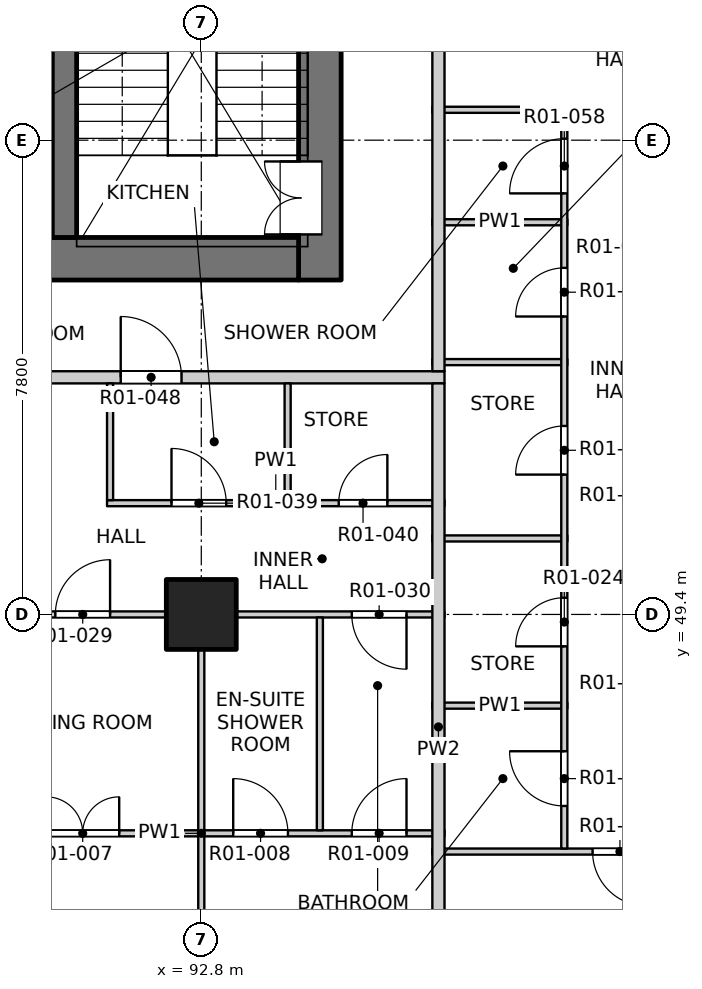
"""IFC4 building model, lengths in metres.
Left out: names, types, materials, properties, quantities, classifications, styles, units other than length and angle.
Written with IfcOpenShell. Run it as: python <this file> out.ifc"""

import sys

from ifc_helpers import new_model, si_unit, direction, frame, frame_2d, origin, origin_2d, place, context, subcontext, project, spatial, rectangle, extrude, element, fill, save


model = new_model("IFC4")
c1 = context("Model", 3, precision=1e-05, world=origin(), true_north=direction((0.0, 1.0)))
c2 = subcontext(c1, "Body", "Model", "MODEL_VIEW")
j1 = project(units=[si_unit("LENGTHUNIT", "METRE"), si_unit("PLANEANGLEUNIT", "RADIAN")], contexts=[c1])
p1 = place(None, origin())
s1 = spatial("IfcSite", under=j1, at=p1, CompositionType="ELEMENT")
p2 = place(p1, origin())
s2 = spatial("IfcBuilding", under=s1, at=p2, CompositionType="ELEMENT")
p3 = place(p2, frame((0.0, 0.0, 19.5)))
s3 = spatial("IfcBuildingStorey", under=s2, at=p3, CompositionType="ELEMENT", Elevation=19.5)
p4 = place(p3, frame((92.8, 49.4, -0.25), z_axis=(0.0, 0.0, 1.0), x_axis=(1.0, 0.0, 0.0)))
e1 = element("IfcColumn", 1, at=p4, inside=s3, PredefinedType="COLUMN", context=c2, shape_type="SweptSolid", body=[
    extrude(rectangle(XDim=1.15, YDim=1.15, at=origin_2d()), origin(), (0.0, 0.0, 1.0), 3.4),
])
p5 = place(p3, frame((94.75, 54.9, -0.25), z_axis=(0.0, 0.0, 1.0), x_axis=(0.0, 1.0, 0.0)))
e2 = element("IfcWall", 2, at=p5, inside=s3, PredefinedType="SOLIDWALL", context=c2, shape_type="SweptSolid", body=[
    extrude(rectangle(XDim=7.05, YDim=0.7, at=frame_2d((3.525, 0.0))), origin(), (0.0, 0.0, 1.0), 3.4),
])
p6 = place(p5, frame((0.75, 0.0, 0.25)))
e3 = element("IfcOpeningElement", 3, at=p6, cuts=e2, PredefinedType="OPENING", context=c2, shape_type="SweptSolid", body=[
    extrude(rectangle(XDim=1.2, YDim=2.1, at=frame_2d((0.6, 1.05))), frame((0.0, 0.36, 0.0), z_axis=(0.0, -1.0, 0.0), x_axis=(1.0, 0.0, 0.0)), (0.0, 0.0, 1.0), 0.72),
])
p7 = place(p3, frame((75.6, 55.25, -0.25), z_axis=(0.0, 0.0, 1.0), x_axis=(1.0, 0.0, 0.0)))
e4 = element("IfcWall", 4, at=p7, inside=s3, PredefinedType="SOLIDWALL", context=c2, shape_type="SweptSolid", body=[
    extrude(rectangle(XDim=18.8, YDim=0.7, at=frame_2d((9.4, 0.0))), origin(), (0.0, 0.0, 1.0), 3.4),
])
p8 = place(p7, frame((8.65, 0.0, 0.25)))
e5 = element("IfcOpeningElement", 5, at=p8, cuts=e4, PredefinedType="OPENING", context=c2, shape_type="SweptSolid", body=[
    extrude(rectangle(XDim=1.5, YDim=2.1, at=frame_2d((0.75, 1.05))), frame((0.0, 0.36, 0.0), z_axis=(0.0, -1.0, 0.0), x_axis=(1.0, 0.0, 0.0)), (0.0, 0.0, 1.0), 0.72),
])
p9 = place(p3, frame((90.55, 55.6, -0.25), z_axis=(0.0, 0.0, 1.0), x_axis=(0.0, 1.0, 0.0)))
e6 = element("IfcWall", 6, at=p9, inside=s3, PredefinedType="SOLIDWALL", context=c2, shape_type="SweptSolid", body=[
    extrude(rectangle(XDim=6.35, YDim=0.4, at=frame_2d((3.175, 0.0))), origin(), (0.0, 0.0, 1.0), 3.4),
])
p10 = place(p3, frame((96.6, 45.5, 0.0), z_axis=(0.0, 0.0, 1.0), x_axis=(1.0, 0.0, 0.0)))
e7 = element("IfcWall", 7, at=p10, inside=s3, PredefinedType="PARTITIONING", context=c2, shape_type="SweptSolid", body=[
    extrude(rectangle(XDim=11.5, YDim=0.1, at=frame_2d((5.75, 0.0))), origin(), (0.0, 0.0, 1.0), 3.15),
])
p11 = place(p10, frame((2.635, 0.0, 0.0)))
e8 = element("IfcOpeningElement", 8, at=p11, cuts=e7, PredefinedType="OPENING", context=c2, shape_type="SweptSolid", body=[
    extrude(rectangle(XDim=0.9, YDim=2.1, at=frame_2d((0.45, 1.05))), frame((0.0, 0.06, 0.0), z_axis=(0.0, -1.0, 0.0), x_axis=(1.0, 0.0, 0.0)), (0.0, 0.0, 1.0), 0.12),
])
p12 = place(p3, frame((88.8, 45.8, 0.0), z_axis=(0.0, 0.0, 1.0), x_axis=(1.0, 0.0, 0.0)))
e9 = element("IfcWall", 9, at=p12, inside=s3, PredefinedType="PARTITIONING", context=c2, shape_type="SweptSolid", body=[
    extrude(rectangle(XDim=8.0, YDim=0.1, at=frame_2d((4.0, 0.0))), origin(), (0.0, 0.0, 1.0), 3.15),
])
p13 = place(p12, frame((1.45, 0.0, 0.0)))
e10 = element("IfcOpeningElement", 10, at=p13, cuts=e9, PredefinedType="OPENING", context=c2, shape_type="SweptSolid", body=[
    extrude(rectangle(XDim=1.2, YDim=2.1, at=frame_2d((0.6, 1.05))), frame((0.0, 0.06, 0.0), z_axis=(0.0, -1.0, 0.0), x_axis=(1.0, 0.0, 0.0)), (0.0, 0.0, 1.0), 0.12),
])
p14 = place(p12, frame((4.525, 0.0, 0.0)))
e11 = element("IfcOpeningElement", 11, at=p14, cuts=e9, PredefinedType="OPENING", context=c2, shape_type="SweptSolid", body=[
    extrude(rectangle(XDim=0.9, YDim=2.1, at=frame_2d((0.45, 1.05))), frame((0.0, 0.06, 0.0), z_axis=(0.0, -1.0, 0.0), x_axis=(1.0, 0.0, 0.0)), (0.0, 0.0, 1.0), 0.12),
])
p15 = place(p12, frame((6.475, 0.0, 0.0)))
e12 = element("IfcOpeningElement", 12, at=p15, cuts=e9, PredefinedType="OPENING", context=c2, shape_type="SweptSolid", body=[
    extrude(rectangle(XDim=0.9, YDim=2.1, at=frame_2d((0.45, 1.05))), frame((0.0, 0.06, 0.0), z_axis=(0.0, -1.0, 0.0), x_axis=(1.0, 0.0, 0.0)), (0.0, 0.0, 1.0), 0.12),
])
p16 = place(p3, frame((96.6, 47.9, 0.0), z_axis=(0.0, 0.0, 1.0), x_axis=(1.0, 0.0, 0.0)))
e13 = element("IfcWall", 13, at=p16, inside=s3, PredefinedType="PARTITIONING", context=c2, shape_type="SweptSolid", body=[
    extrude(rectangle(XDim=2.22, YDim=0.1, at=frame_2d((1.11, 0.0))), origin(), (0.0, 0.0, 1.0), 3.15),
])
p17 = place(p3, frame((73.2, 49.4, 0.0), z_axis=(0.0, 0.0, 1.0), x_axis=(1.0, 0.0, 0.0)))
e14 = element("IfcWall", 14, at=p17, inside=s3, PredefinedType="PARTITIONING", context=c2, shape_type="SweptSolid", body=[
    extrude(rectangle(XDim=23.6, YDim=0.1, at=frame_2d((11.8, 0.0))), origin(), (0.0, 0.0, 1.0), 3.15),
])
p18 = place(p17, frame((2.425, 0.0, 0.0)))
e15 = element("IfcOpeningElement", 15, at=p18, cuts=e14, PredefinedType="OPENING", context=c2, shape_type="SweptSolid", body=[
    extrude(rectangle(XDim=0.9, YDim=2.1, at=frame_2d((0.45, 1.05))), frame((0.0, 0.06, 0.0), z_axis=(0.0, -1.0, 0.0), x_axis=(1.0, 0.0, 0.0)), (0.0, 0.0, 1.0), 0.12),
])
p19 = place(p17, frame((5.5, 0.0, 0.0)))
e16 = element("IfcOpeningElement", 16, at=p19, cuts=e14, PredefinedType="OPENING", context=c2, shape_type="SweptSolid", body=[
    extrude(rectangle(XDim=0.9, YDim=2.1, at=frame_2d((0.45, 1.05))), frame((0.0, 0.06, 0.0), z_axis=(0.0, -1.0, 0.0), x_axis=(1.0, 0.0, 0.0)), (0.0, 0.0, 1.0), 0.12),
])
p20 = place(p17, frame((9.4, 0.0, 0.0)))
e17 = element("IfcOpeningElement", 17, at=p20, cuts=e14, PredefinedType="OPENING", context=c2, shape_type="SweptSolid", body=[
    extrude(rectangle(XDim=0.9, YDim=2.1, at=frame_2d((0.45, 1.05))), frame((0.0, 0.06, 0.0), z_axis=(0.0, -1.0, 0.0), x_axis=(1.0, 0.0, 0.0)), (0.0, 0.0, 1.0), 0.12),
])
p21 = place(p17, frame((14.275, 0.0, 0.0)))
e18 = element("IfcOpeningElement", 18, at=p21, cuts=e14, PredefinedType="OPENING", context=c2, shape_type="SweptSolid", body=[
    extrude(rectangle(XDim=0.9, YDim=2.1, at=frame_2d((0.45, 1.05))), frame((0.0, 0.06, 0.0), z_axis=(0.0, -1.0, 0.0), x_axis=(1.0, 0.0, 0.0)), (0.0, 0.0, 1.0), 0.12),
])
p22 = place(p17, frame((17.2, 0.0, 0.0)))
e19 = element("IfcOpeningElement", 19, at=p22, cuts=e14, PredefinedType="OPENING", context=c2, shape_type="SweptSolid", body=[
    extrude(rectangle(XDim=0.9, YDim=2.1, at=frame_2d((0.45, 1.05))), frame((0.0, 0.06, 0.0), z_axis=(0.0, -1.0, 0.0), x_axis=(1.0, 0.0, 0.0)), (0.0, 0.0, 1.0), 0.12),
])
p23 = place(p17, frame((22.075, 0.0, 0.0)))
e20 = element("IfcOpeningElement", 20, at=p23, cuts=e14, PredefinedType="OPENING", context=c2, shape_type="SweptSolid", body=[
    extrude(rectangle(XDim=0.9, YDim=2.1, at=frame_2d((0.45, 1.05))), frame((0.0, 0.06, 0.0), z_axis=(0.0, -1.0, 0.0), x_axis=(1.0, 0.0, 0.0)), (0.0, 0.0, 1.0), 0.12),
])
p24 = place(p3, frame((96.6, 50.65, 0.0), z_axis=(0.0, 0.0, 1.0), x_axis=(1.0, 0.0, 0.0)))
e21 = element("IfcWall", 21, at=p24, inside=s3, PredefinedType="PARTITIONING", context=c2, shape_type="SweptSolid", body=[
    extrude(rectangle(XDim=2.22, YDim=0.1, at=frame_2d((1.11, 0.0))), origin(), (0.0, 0.0, 1.0), 3.15),
])
p25 = place(p3, frame((91.25, 51.23, 0.0), z_axis=(0.0, 0.0, 1.0), x_axis=(1.0, 0.0, 0.0)))
e22 = element("IfcWall", 22, at=p25, inside=s3, PredefinedType="PARTITIONING", context=c2, shape_type="SweptSolid", body=[
    extrude(rectangle(XDim=5.55, YDim=0.1, at=frame_2d((2.775, 0.0))), origin(), (0.0, 0.0, 1.0), 3.15),
])
p26 = place(p25, frame((1.06, 0.0, 0.0)))
e23 = element("IfcOpeningElement", 23, at=p26, cuts=e22, PredefinedType="OPENING", context=c2, shape_type="SweptSolid", body=[
    extrude(rectangle(XDim=0.9, YDim=2.1, at=frame_2d((0.45, 1.05))), frame((0.0, 0.06, 0.0), z_axis=(0.0, -1.0, 0.0), x_axis=(1.0, 0.0, 0.0)), (0.0, 0.0, 1.0), 0.12),
])
p27 = place(p25, frame((3.81, 0.0, 0.0)))
e24 = element("IfcOpeningElement", 24, at=p27, cuts=e22, PredefinedType="OPENING", context=c2, shape_type="SweptSolid", body=[
    extrude(rectangle(XDim=0.8, YDim=2.1, at=frame_2d((0.4, 1.05))), frame((0.0, 0.06, 0.0), z_axis=(0.0, -1.0, 0.0), x_axis=(1.0, 0.0, 0.0)), (0.0, 0.0, 1.0), 0.12),
])
p28 = place(p3, frame((73.2, 53.3, 0.0), z_axis=(0.0, 0.0, 1.0), x_axis=(1.0, 0.0, 0.0)))
e25 = element("IfcWall", 25, at=p28, inside=s3, PredefinedType="PARTITIONING", context=c2, shape_type="SweptSolid", body=[
    extrude(rectangle(XDim=23.6, YDim=0.2, at=frame_2d((11.8, 0.0))), origin(), (0.0, 0.0, 1.0), 3.15),
])
p29 = place(p28, frame((6.525, 0.0, 0.0)))
e26 = element("IfcOpeningElement", 26, at=p29, cuts=e25, PredefinedType="OPENING", context=c2, shape_type="SweptSolid", body=[
    extrude(rectangle(XDim=1.0, YDim=2.1, at=frame_2d((0.5, 1.05))), frame((0.0, 0.11, 0.0), z_axis=(0.0, -1.0, 0.0), x_axis=(1.0, 0.0, 0.0)), (0.0, 0.0, 1.0), 0.22),
])
p30 = place(p28, frame((18.275, 0.0, 0.0)))
e27 = element("IfcOpeningElement", 27, at=p30, cuts=e25, PredefinedType="OPENING", context=c2, shape_type="SweptSolid", body=[
    extrude(rectangle(XDim=1.0, YDim=2.1, at=frame_2d((0.5, 1.05))), frame((0.0, 0.11, 0.0), z_axis=(0.0, -1.0, 0.0), x_axis=(1.0, 0.0, 0.0)), (0.0, 0.0, 1.0), 0.22),
])
for number, where, z_axis, x_axis in (
    (28, (96.6, 53.55, 0.0), (0.0, 0.0, 1.0), (1.0, 0.0, 0.0)),
    (29, (96.6, 55.85, 0.0), (0.0, 0.0, 1.0), (1.0, 0.0, 0.0)),
    (30, (96.6, 57.7, 0.0), (0.0, 0.0, 1.0), (1.0, 0.0, 0.0)),
):
    element("IfcWall", number, at=place(p3, frame(where, z_axis=z_axis, x_axis=x_axis)), inside=s3, PredefinedType="PARTITIONING", context=c2, shape_type="SweptSolid", body=[
        extrude(rectangle(XDim=2.22, YDim=0.1, at=frame_2d((1.11, 0.0))), origin(), (0.0, 0.0, 1.0), 3.15),
    ])
p31 = place(p3, frame((91.3, 51.28, 0.0), z_axis=(0.0, 0.0, 1.0), x_axis=(0.0, 1.0, 0.0)))
e31 = element("IfcWall", 31, at=p31, inside=s3, PredefinedType="PARTITIONING", context=c2, shape_type="SweptSolid", body=[
    extrude(rectangle(XDim=1.92, YDim=0.1, at=frame_2d((0.96, 0.0))), origin(), (0.0, 0.0, 1.0), 3.15),
])
p32 = place(p3, frame((92.8, 41.9, 0.0), z_axis=(0.0, 0.0, 1.0), x_axis=(0.0, 1.0, 0.0)))
e32 = element("IfcWall", 32, at=p32, inside=s3, PredefinedType="PARTITIONING", context=c2, shape_type="SweptSolid", body=[
    extrude(rectangle(XDim=7.45, YDim=0.1, at=frame_2d((3.725, 0.0))), origin(), (0.0, 0.0, 1.0), 2.55),
])
p33 = place(p3, frame((94.22, 51.28, 0.0), z_axis=(0.0, 0.0, 1.0), x_axis=(0.0, 1.0, 0.0)))
e33 = element("IfcWall", 33, at=p33, inside=s3, PredefinedType="PARTITIONING", context=c2, shape_type="SweptSolid", body=[
    extrude(rectangle(XDim=1.92, YDim=0.1, at=frame_2d((0.96, 0.0))), origin(), (0.0, 0.0, 1.0), 3.15),
])
p34 = place(p3, frame((94.75, 45.85, 0.0), z_axis=(0.0, 0.0, 1.0), x_axis=(0.0, 1.0, 0.0)))
e34 = element("IfcWall", 34, at=p34, inside=s3, PredefinedType="PARTITIONING", context=c2, shape_type="SweptSolid", body=[
    extrude(rectangle(XDim=3.5, YDim=0.1, at=frame_2d((1.75, 0.0))), origin(), (0.0, 0.0, 1.0), 3.15),
])
p35 = place(p3, frame((96.7, 41.9, 0.0), z_axis=(0.0, 0.0, 1.0), x_axis=(0.0, 1.0, 0.0)))
e35 = element("IfcWall", 35, at=p35, inside=s3, PredefinedType="PARTITIONING", context=c2, shape_type="SweptSolid", body=[
    extrude(rectangle(XDim=11.3, YDim=0.2, at=frame_2d((5.65, 0.0))), origin(), (0.0, 0.0, 1.0), 3.15),
])
p36 = place(p3, frame((96.7, 53.4, 0.0), z_axis=(0.0, 0.0, 1.0), x_axis=(0.0, 1.0, 0.0)))
e36 = element("IfcWall", 36, at=p36, inside=s3, PredefinedType="PARTITIONING", context=c2, shape_type="SweptSolid", body=[
    extrude(rectangle(XDim=31.0, YDim=0.2, at=frame_2d((15.5, 0.0))), origin(), (0.0, 0.0, 1.0), 3.15),
])
p37 = place(p36, frame((5.575, 0.0, 0.0)))
e37 = element("IfcOpeningElement", 37, at=p37, cuts=e36, PredefinedType="OPENING", context=c2, shape_type="SweptSolid", body=[
    extrude(rectangle(XDim=1.0, YDim=2.1, at=frame_2d((0.5, 1.05))), frame((0.0, 0.11, 0.0), z_axis=(0.0, -1.0, 0.0), x_axis=(1.0, 0.0, 0.0)), (0.0, 0.0, 1.0), 0.22),
])
p38 = place(p36, frame((10.075, 0.0, 0.0)))
e38 = element("IfcOpeningElement", 38, at=p38, cuts=e36, PredefinedType="OPENING", context=c2, shape_type="SweptSolid", body=[
    extrude(rectangle(XDim=1.0, YDim=2.1, at=frame_2d((0.5, 1.05))), frame((0.0, 0.11, 0.0), z_axis=(0.0, -1.0, 0.0), x_axis=(1.0, 0.0, 0.0)), (0.0, 0.0, 1.0), 0.22),
])
p39 = place(p36, frame((28.975, 0.0, 0.0)))
e39 = element("IfcOpeningElement", 39, at=p39, cuts=e36, PredefinedType="OPENING", context=c2, shape_type="SweptSolid", body=[
    extrude(rectangle(XDim=1.0, YDim=2.1, at=frame_2d((0.5, 1.05))), frame((0.0, 0.11, 0.0), z_axis=(0.0, -1.0, 0.0), x_axis=(1.0, 0.0, 0.0)), (0.0, 0.0, 1.0), 0.22),
])
p40 = place(p3, frame((98.77, 45.55, 0.0), z_axis=(0.0, 0.0, 1.0), x_axis=(0.0, 1.0, 0.0)))
e40 = element("IfcWall", 40, at=p40, inside=s3, PredefinedType="PARTITIONING", context=c2, shape_type="SweptSolid", body=[
    extrude(rectangle(XDim=12.1, YDim=0.1, at=frame_2d((6.05, 0.0))), origin(), (0.0, 0.0, 1.0), 3.15),
])
p41 = place(p40, frame((0.7, 0.0, 0.0)))
e41 = element("IfcOpeningElement", 41, at=p41, cuts=e40, PredefinedType="OPENING", context=c2, shape_type="SweptSolid", body=[
    extrude(rectangle(XDim=0.9, YDim=2.1, at=frame_2d((0.45, 1.05))), frame((0.0, 0.06, 0.0), z_axis=(0.0, -1.0, 0.0), x_axis=(1.0, 0.0, 0.0)), (0.0, 0.0, 1.0), 0.12),
])
p42 = place(p40, frame((3.325, 0.0, 0.0)))
e42 = element("IfcOpeningElement", 42, at=p42, cuts=e40, PredefinedType="OPENING", context=c2, shape_type="SweptSolid", body=[
    extrude(rectangle(XDim=0.8, YDim=2.1, at=frame_2d((0.4, 1.05))), frame((0.0, 0.06, 0.0), z_axis=(0.0, -1.0, 0.0), x_axis=(1.0, 0.0, 0.0)), (0.0, 0.0, 1.0), 0.12),
])
p43 = place(p40, frame((6.15, 0.0, 0.0)))
e43 = element("IfcOpeningElement", 43, at=p43, cuts=e40, PredefinedType="OPENING", context=c2, shape_type="SweptSolid", body=[
    extrude(rectangle(XDim=0.8, YDim=2.1, at=frame_2d((0.4, 1.05))), frame((0.0, 0.06, 0.0), z_axis=(0.0, -1.0, 0.0), x_axis=(1.0, 0.0, 0.0)), (0.0, 0.0, 1.0), 0.12),
])
p44 = place(p40, frame((8.75, 0.0, 0.0)))
e44 = element("IfcOpeningElement", 44, at=p44, cuts=e40, PredefinedType="OPENING", context=c2, shape_type="SweptSolid", body=[
    extrude(rectangle(XDim=0.8, YDim=2.1, at=frame_2d((0.4, 1.05))), frame((0.0, 0.06, 0.0), z_axis=(0.0, -1.0, 0.0), x_axis=(1.0, 0.0, 0.0)), (0.0, 0.0, 1.0), 0.12),
])
p45 = place(p40, frame((10.775, 0.0, 0.0)))
e45 = element("IfcOpeningElement", 45, at=p45, cuts=e40, PredefinedType="OPENING", context=c2, shape_type="SweptSolid", body=[
    extrude(rectangle(XDim=0.9, YDim=2.1, at=frame_2d((0.45, 1.05))), frame((0.0, 0.06, 0.0), z_axis=(0.0, -1.0, 0.0), x_axis=(1.0, 0.0, 0.0)), (0.0, 0.0, 1.0), 0.12),
])
p46 = place(p11, origin())
e46 = element("IfcDoor", 46, at=p46, inside=s3, OperationType="SINGLE_SWING_LEFT", PredefinedType="DOOR", context=c2, shape_type="SweptSolid", body=[
    extrude(rectangle(XDim=0.9, YDim=2.1, at=frame_2d((0.45, 1.05))), frame((0.0, 0.025, 0.0), z_axis=(0.0, -1.0, 0.0), x_axis=(1.0, 0.0, 0.0)), (0.0, 0.0, 1.0), 0.05),
])
fill(e8, e46)
p47 = place(p13, origin())
e47 = element("IfcDoor", 47, at=p47, inside=s3, OperationType="DOUBLE_DOOR_SINGLE_SWING", PredefinedType="DOOR", context=c2, shape_type="SweptSolid", body=[
    extrude(rectangle(XDim=1.2, YDim=2.1, at=frame_2d((0.6, 1.05))), frame((0.0, 0.025, 0.0), z_axis=(0.0, -1.0, 0.0), x_axis=(1.0, 0.0, 0.0)), (0.0, 0.0, 1.0), 0.05),
])
fill(e10, e47)
p48 = place(p14, origin())
e48 = element("IfcDoor", 48, at=p48, inside=s3, OperationType="SINGLE_SWING_LEFT", PredefinedType="DOOR", context=c2, shape_type="SweptSolid", body=[
    extrude(rectangle(XDim=0.9, YDim=2.1, at=frame_2d((0.45, 1.05))), frame((0.0, 0.025, 0.0), z_axis=(0.0, -1.0, 0.0), x_axis=(1.0, 0.0, 0.0)), (0.0, 0.0, 1.0), 0.05),
])
fill(e11, e48)
p49 = place(p15, origin())
e49 = element("IfcDoor", 49, at=p49, inside=s3, OperationType="SINGLE_SWING_RIGHT", PredefinedType="DOOR", context=c2, shape_type="SweptSolid", body=[
    extrude(rectangle(XDim=0.9, YDim=2.1, at=frame_2d((0.45, 1.05))), frame((0.0, 0.025, 0.0), z_axis=(0.0, -1.0, 0.0), x_axis=(1.0, 0.0, 0.0)), (0.0, 0.0, 1.0), 0.05),
])
fill(e12, e49)
p50 = place(p41, origin())
e50 = element("IfcDoor", 50, at=p50, inside=s3, OperationType="SINGLE_SWING_RIGHT", PredefinedType="DOOR", context=c2, shape_type="SweptSolid", body=[
    extrude(rectangle(XDim=0.9, YDim=2.1, at=frame_2d((0.45, 1.05))), frame((0.0, 0.025, 0.0), z_axis=(0.0, -1.0, 0.0), x_axis=(1.0, 0.0, 0.0)), (0.0, 0.0, 1.0), 0.05),
])
fill(e41, e50)
p51 = place(p42, origin())
e51 = element("IfcDoor", 51, at=p51, inside=s3, OperationType="SINGLE_SWING_LEFT", PredefinedType="DOOR", context=c2, shape_type="SweptSolid", body=[
    extrude(rectangle(XDim=0.8, YDim=2.1, at=frame_2d((0.4, 1.05))), frame((0.0, 0.025, 0.0), z_axis=(0.0, -1.0, 0.0), x_axis=(1.0, 0.0, 0.0)), (0.0, 0.0, 1.0), 0.05),
])
fill(e42, e51)
p52 = place(p22, origin())
e52 = element("IfcDoor", 52, at=p52, inside=s3, OperationType="SINGLE_SWING_RIGHT", PredefinedType="DOOR", context=c2, shape_type="SweptSolid", body=[
    extrude(rectangle(XDim=0.9, YDim=2.1, at=frame_2d((0.45, 1.05))), frame((0.0, 0.025, 0.0), z_axis=(0.0, -1.0, 0.0), x_axis=(1.0, 0.0, 0.0)), (0.0, 0.0, 1.0), 0.05),
])
fill(e19, e52)
p53 = place(p23, origin())
e53 = element("IfcDoor", 53, at=p53, inside=s3, OperationType="SINGLE_SWING_LEFT", PredefinedType="DOOR", context=c2, shape_type="SweptSolid", body=[
    extrude(rectangle(XDim=0.9, YDim=2.1, at=frame_2d((0.45, 1.05))), frame((0.0, 0.025, 0.0), z_axis=(0.0, -1.0, 0.0), x_axis=(1.0, 0.0, 0.0)), (0.0, 0.0, 1.0), 0.05),
])
fill(e20, e53)
p54 = place(p26, origin())
e54 = element("IfcDoor", 54, at=p54, inside=s3, OperationType="SINGLE_SWING_LEFT", PredefinedType="DOOR", context=c2, shape_type="SweptSolid", body=[
    extrude(rectangle(XDim=0.9, YDim=2.1, at=frame_2d((0.45, 1.05))), frame((0.0, 0.025, 0.0), z_axis=(0.0, -1.0, 0.0), x_axis=(1.0, 0.0, 0.0)), (0.0, 0.0, 1.0), 0.05),
])
fill(e23, e54)
p55 = place(p27, origin())
e55 = element("IfcDoor", 55, at=p55, inside=s3, OperationType="SINGLE_SWING_RIGHT", PredefinedType="DOOR", context=c2, shape_type="SweptSolid", body=[
    extrude(rectangle(XDim=0.8, YDim=2.1, at=frame_2d((0.4, 1.05))), frame((0.0, 0.025, 0.0), z_axis=(0.0, -1.0, 0.0), x_axis=(1.0, 0.0, 0.0)), (0.0, 0.0, 1.0), 0.05),
])
fill(e24, e55)
p56 = place(p43, origin())
e56 = element("IfcDoor", 56, at=p56, inside=s3, OperationType="SINGLE_SWING_LEFT", PredefinedType="DOOR", context=c2, shape_type="SweptSolid", body=[
    extrude(rectangle(XDim=0.8, YDim=2.1, at=frame_2d((0.4, 1.05))), frame((0.0, 0.025, 0.0), z_axis=(0.0, -1.0, 0.0), x_axis=(1.0, 0.0, 0.0)), (0.0, 0.0, 1.0), 0.05),
])
fill(e43, e56)
p57 = place(p30, origin())
e57 = element("IfcDoor", 57, at=p57, inside=s3, OperationType="SINGLE_SWING_LEFT", PredefinedType="DOOR", context=c2, shape_type="SweptSolid", body=[
    extrude(rectangle(XDim=1.0, YDim=2.1, at=frame_2d((0.5, 1.05))), frame((0.0, 0.025, 0.0), z_axis=(0.0, -1.0, 0.0), x_axis=(1.0, 0.0, 0.0)), (0.0, 0.0, 1.0), 0.05),
])
fill(e27, e57)
p58 = place(p44, origin())
e58 = element("IfcDoor", 58, at=p58, inside=s3, OperationType="SINGLE_SWING_LEFT", PredefinedType="DOOR", context=c2, shape_type="SweptSolid", body=[
    extrude(rectangle(XDim=0.8, YDim=2.1, at=frame_2d((0.4, 1.05))), frame((0.0, 0.025, 0.0), z_axis=(0.0, -1.0, 0.0), x_axis=(1.0, 0.0, 0.0)), (0.0, 0.0, 1.0), 0.05),
])
fill(e44, e58)
p59 = place(p6, origin())
e59 = element("IfcDoor", 59, at=p59, inside=s3, OperationType="DOUBLE_DOOR_SINGLE_SWING", PredefinedType="DOOR", context=c2, shape_type="SweptSolid", body=[
    extrude(rectangle(XDim=1.2, YDim=2.1, at=frame_2d((0.6, 1.05))), frame((0.0, 0.335, 0.0), z_axis=(0.0, -1.0, 0.0), x_axis=(1.0, 0.0, 0.0)), (0.0, 0.0, 1.0), 0.05),
])
fill(e3, e59)
p60 = place(p45, origin())
e60 = element("IfcDoor", 60, at=p60, inside=s3, OperationType="SINGLE_SWING_LEFT", PredefinedType="DOOR", context=c2, shape_type="SweptSolid", body=[
    extrude(rectangle(XDim=0.9, YDim=2.1, at=frame_2d((0.45, 1.05))), frame((0.0, 0.025, 0.0), z_axis=(0.0, -1.0, 0.0), x_axis=(1.0, 0.0, 0.0)), (0.0, 0.0, 1.0), 0.05),
])
fill(e45, e60)
save(model, sys.argv[1])
